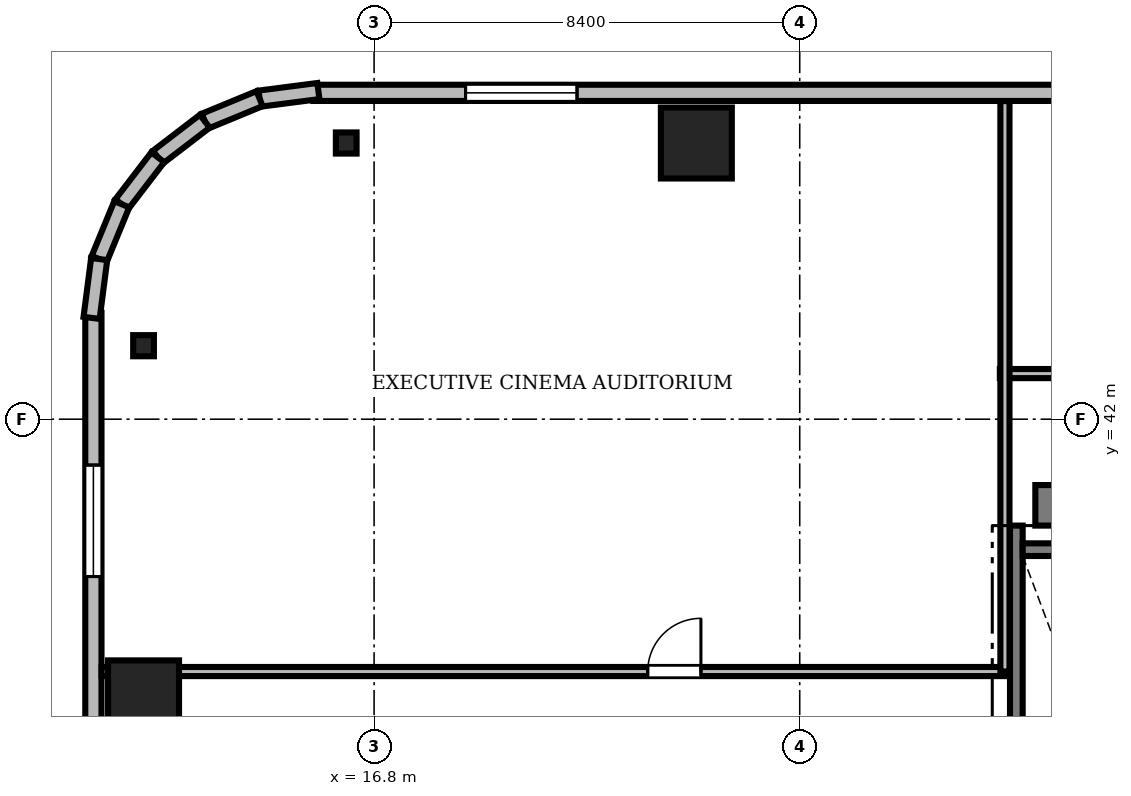
"""IFC4 building model, lengths in metres.
Left out: names, types, materials, properties, quantities, classifications, styles, units other than length and angle.
Written with IfcOpenShell. Run it as: python <this file> out.ifc"""

import sys

from ifc_helpers import new_model, si_unit, direction, frame, frame_2d, origin, origin_2d, place, context, subcontext, project, spatial, rectangle, i_section, extrude, source, transform, mapped, element, fill, save


model = new_model("IFC4")
c1 = context("Model", 3, precision=1e-05, world=origin(), true_north=direction((0.0, 1.0)))
c2 = subcontext(c1, "Body", "Model", "MODEL_VIEW")
j1 = project(units=[si_unit("LENGTHUNIT", "METRE"), si_unit("PLANEANGLEUNIT", "RADIAN")], contexts=[c1])
p1 = place(None, origin())
s1 = spatial("IfcSite", under=j1, at=p1, CompositionType="ELEMENT")
p2 = place(p1, origin())
s2 = spatial("IfcBuilding", under=s1, at=p2, CompositionType="ELEMENT")
p3 = place(p2, frame((0.0, 0.0, 177.2)))
s3 = spatial("IfcBuildingStorey", under=s2, at=p3, CompositionType="ELEMENT", Elevation=177.2)
m1 = source(origin(), c2, "Body", "SweptSolid", [
    extrude(rectangle(XDim=17.52, YDim=0.8, at=frame_2d((8.76, 0.0))), origin(), (0.0, 0.0, 1.0), 3.58),
])
p4 = place(p3, frame((29.85, 40.3, 0.0), z_axis=(0.0, 0.0, 1.0), x_axis=(1.0, 0.0, 0.0)))
e1 = element("IfcWall", 1, at=p4, inside=s3, PredefinedType="SHEAR", context=c2, shape_type="MappedRepresentation", body=[
    mapped(m1, transform((0.0, 0.0, 0.0), scale=1.0)),
])
m2 = source(origin(), c2, "Body", "SweptSolid", [
    extrude(rectangle(XDim=1.4, YDim=1.4, at=origin_2d()), origin(), (0.0, 0.0, 1.0), 3.58),
])
for number, where, z_axis, x_axis in (
    (2, (23.16, 47.45, 0.0), (0.0, 0.0, 1.0), (1.0, 0.0, 0.0)),
    (3, (12.25, 36.54, 0.0), (0.0, 0.0, 1.0), (1.0, 0.0, 0.0)),
):
    element("IfcColumn", number, at=place(p3, frame(where, z_axis=z_axis, x_axis=x_axis)), inside=s3, PredefinedType="COLUMN", context=c2, shape_type="MappedRepresentation", body=[
        mapped(m2, transform((0.0, 0.0, 0.0), scale=1.0)),
    ])
m3 = source(origin(), c2, "Body", "SweptSolid", [
    extrude(i_section(OverallWidth=0.409, OverallDepth=0.417, WebThickness=0.021, FlangeThickness=0.033, FilletRadius=0.015, at=origin_2d()), origin(), (0.0, 0.0, 1.0), 3.58),
])
for number, where, z_axis, x_axis in (
    (4, (16.25, 47.45, 0.0), (0.0, 0.0, 1.0), (1.0, 0.0, 0.0)),
    (5, (12.25, 43.45, 0.0), (0.0, 0.0, 1.0), (1.0, 0.0, 0.0)),
):
    element("IfcColumn", number, at=place(p3, frame(where, z_axis=z_axis, x_axis=x_axis)), inside=s3, PredefinedType="COLUMN", context=c2, shape_type="MappedRepresentation", body=[
        mapped(m3, transform((0.0, 0.0, 0.0), scale=1.0)),
    ])
m4 = source(origin(), c2, "Body", "SweptSolid", [
    extrude(rectangle(XDim=15.6, YDim=0.32, at=frame_2d((7.8, 0.0))), origin(), (0.0, 0.0, 1.0), 3.58),
])
p5 = place(p3, frame((31.2, 48.44, 0.0), z_axis=(0.0, 0.0, 1.0), x_axis=(-1.0, 0.0, 0.0)))
e6 = element("IfcWall", 6, at=p5, inside=s3, PredefinedType="SOLIDWALL", context=c2, shape_type="MappedRepresentation", body=[
    mapped(m4, transform((0.0, 0.0, 0.0), scale=1.0)),
])
m5 = source(origin(), c2, "Body", "SweptSolid", [
    extrude(rectangle(XDim=2.2, YDim=2.4, at=frame_2d((1.1, 1.2))), frame((0.0, 0.17, 0.0), z_axis=(0.0, -1.0, 0.0), x_axis=(1.0, 0.0, 0.0)), (0.0, 0.0, 1.0), 0.34),
])
p6 = place(p5, frame((10.395, 0.0, 0.72)))
e7 = element("IfcOpeningElement", 7, at=p6, cuts=e6, PredefinedType="OPENING", context=c2, shape_type="MappedRepresentation", body=[
    mapped(m5, transform((0.0, 0.0, 0.0), scale=1.0)),
])
m6 = source(origin(), c2, "Body", "SweptSolid", [
    extrude(rectangle(XDim=15.6, YDim=0.32, at=frame_2d((7.8, 0.0))), origin(), (0.0, 0.0, 1.0), 3.58),
])
p7 = place(p3, frame((11.26, 44.1, 0.0), z_axis=(0.0, 0.0, 1.0), x_axis=(0.0, -1.0, 0.0)))
e8 = element("IfcWall", 8, at=p7, inside=s3, PredefinedType="SOLIDWALL", context=c2, shape_type="MappedRepresentation", body=[
    mapped(m6, transform((0.0, 0.0, 0.0), scale=1.0)),
])
m7 = source(origin(), c2, "Body", "SweptSolid", [
    extrude(rectangle(XDim=1.4, YDim=2.3, at=frame_2d((0.7, 1.15))), frame((0.0, 0.17, 0.0), z_axis=(0.0, -1.0, 0.0), x_axis=(1.0, 0.0, 0.0)), (0.0, 0.0, 1.0), 0.34),
])
p8 = place(p7, frame((9.61, 0.0, 0.0)))
e9 = element("IfcOpeningElement", 9, at=p8, cuts=e8, PredefinedType="OPENING", context=c2, shape_type="MappedRepresentation", body=[
    mapped(m7, transform((0.0, 0.0, 0.0), scale=1.0)),
])
p9 = place(p7, frame((3.005, 0.0, 0.72)))
e10 = element("IfcOpeningElement", 10, at=p9, cuts=e8, PredefinedType="OPENING", context=c2, shape_type="MappedRepresentation", body=[
    mapped(m5, transform((0.0, 0.0, 0.0), scale=1.0)),
])
m8 = source(origin(), c2, "Body", "SweptSolid", [
    extrude(rectangle(XDim=1.17, YDim=0.32, at=frame_2d((0.585, 0.0))), origin(), (0.0, 0.0, 1.0), 3.58),
])
p10 = place(p3, frame((15.7, 48.476, 0.0), z_axis=(0.0, 0.0, 1.0), x_axis=(-0.991735963317, -0.128295670475, 0.0)))
e11 = element("IfcWall", 11, at=p10, inside=s3, PredefinedType="SOLIDWALL", context=c2, shape_type="MappedRepresentation", body=[
    mapped(m8, transform((0.0, 0.0, 0.0), scale=1.0)),
])
m9 = source(origin(), c2, "Body", "SweptSolid", [
    extrude(rectangle(XDim=1.169, YDim=0.32, at=frame_2d((0.584, 0.0))), origin(), (0.0, 0.0, 1.0), 3.58),
])
p11 = place(p3, frame((14.54, 48.325, 0.0), z_axis=(0.0, 0.0, 1.0), x_axis=(-0.924552646638, -0.381054331552, 0.0)))
e12 = element("IfcWall", 12, at=p11, inside=s3, PredefinedType="SOLIDWALL", context=c2, shape_type="MappedRepresentation", body=[
    mapped(m9, transform((0.0, 0.0, 0.0), scale=1.0)),
])
m10 = source(origin(), c2, "Body", "SweptSolid", [
    extrude(rectangle(XDim=1.169, YDim=0.32, at=frame_2d((0.584, 0.0))), origin(), (0.0, 0.0, 1.0), 3.58),
])
p12 = place(p3, frame((13.459, 47.88, 0.0), z_axis=(0.0, 0.0, 1.0), x_axis=(-0.793663520347, -0.608356981114, 0.0)))
e13 = element("IfcWall", 13, at=p12, inside=s3, PredefinedType="SOLIDWALL", context=c2, shape_type="MappedRepresentation", body=[
    mapped(m10, transform((0.0, 0.0, 0.0), scale=1.0)),
])
m11 = source(origin(), c2, "Body", "SweptSolid", [
    extrude(rectangle(XDim=1.169, YDim=0.32, at=frame_2d((0.584, 0.0))), origin(), (0.0, 0.0, 1.0), 3.58),
])
p13 = place(p3, frame((12.531, 47.169, 0.0), z_axis=(0.0, 0.0, 1.0), x_axis=(-0.608387696831, -0.793639975269, 0.0)))
e14 = element("IfcWall", 14, at=p13, inside=s3, PredefinedType="SOLIDWALL", context=c2, shape_type="MappedRepresentation", body=[
    mapped(m11, transform((0.0, 0.0, 0.0), scale=1.0)),
])
p14 = place(p3, frame((11.82, 46.241, 0.0), z_axis=(0.0, 0.0, 1.0), x_axis=(-0.381054331552, -0.924552646638, 0.0)))
e15 = element("IfcWall", 15, at=p14, inside=s3, PredefinedType="SOLIDWALL", context=c2, shape_type="MappedRepresentation", body=[
    mapped(m9, transform((0.0, 0.0, 0.0), scale=1.0)),
])
p15 = place(p3, frame((11.375, 45.16, 0.0), z_axis=(0.0, 0.0, 1.0), x_axis=(-0.128295670475, -0.991735963317, 0.0)))
e16 = element("IfcWall", 16, at=p15, inside=s3, PredefinedType="SOLIDWALL", context=c2, shape_type="MappedRepresentation", body=[
    mapped(m8, transform((0.0, 0.0, 0.0), scale=1.0)),
])
m12 = source(origin(), c2, "Body", "SweptSolid", [
    extrude(rectangle(XDim=9.25, YDim=0.25, at=frame_2d((4.625, 0.0))), origin(), (0.0, 0.0, 1.0), 3.6),
])
p16 = place(p3, frame((29.475, 30.65, 0.0), z_axis=(0.0, 0.0, 1.0), x_axis=(0.0, 1.0, 0.0)))
e17 = element("IfcWall", 17, at=p16, inside=s3, PredefinedType="SOLIDWALL", context=c2, shape_type="MappedRepresentation", body=[
    mapped(m12, transform((0.0, 0.0, 0.0), scale=1.0)),
])
m13 = source(origin(), c2, "Body", "SweptSolid", [
    extrude(rectangle(XDim=3.15, YDim=0.25, at=frame_2d((1.575, 0.0))), origin(), (0.0, 0.0, 1.0), 3.6),
])
p17 = place(p3, frame((29.6, 39.425, 0.0), z_axis=(0.0, 0.0, 1.0), x_axis=(1.0, 0.0, 0.0)))
e18 = element("IfcWall", 18, at=p17, inside=s3, PredefinedType="SOLIDWALL", context=c2, shape_type="MappedRepresentation", body=[
    mapped(m13, transform((0.0, 0.0, 0.0), scale=1.0)),
])
m14 = source(origin(), c2, "Body", "SweptSolid", [
    extrude(rectangle(XDim=28.428, YDim=0.18, at=frame_2d((14.214, 0.0))), origin(), (0.0, 0.0, 1.0), 2.822),
])
p18 = place(p3, frame((29.15, 42.9, 0.0), z_axis=(0.0, 0.0, 1.0), x_axis=(1.0, 0.0, 0.0)))
e19 = element("IfcWall", 19, at=p18, inside=s3, PredefinedType="PARTITIONING", context=c2, shape_type="MappedRepresentation", body=[
    mapped(m14, transform((0.0, 0.0, 0.0), scale=1.0)),
])
m15 = source(origin(), c2, "Body", "SweptSolid", [
    extrude(rectangle(XDim=1.05, YDim=2.2, at=frame_2d((0.525, 1.1))), frame((0.0, 0.1, 0.0), z_axis=(0.0, -1.0, 0.0), x_axis=(1.0, 0.0, 0.0)), (0.0, 0.0, 1.0), 0.2),
])
p19 = place(p18, frame((4.5, 0.0, 0.0)))
e20 = element("IfcOpeningElement", 20, at=p19, cuts=e19, PredefinedType="OPENING", context=c2, shape_type="MappedRepresentation", body=[
    mapped(m15, transform((0.0, 0.0, 0.0), scale=1.0)),
])
m16 = source(origin(), c2, "Body", "SweptSolid", [
    extrude(rectangle(XDim=17.828, YDim=0.18, at=frame_2d((8.914, 0.0))), origin(), (0.0, 0.0, 1.0), 2.822),
])
p20 = place(p3, frame((11.422, 37.02, 0.0), z_axis=(0.0, 0.0, 1.0), x_axis=(1.0, 0.0, 0.0)))
e21 = element("IfcWall", 21, at=p20, inside=s3, PredefinedType="PARTITIONING", context=c2, shape_type="MappedRepresentation", body=[
    mapped(m16, transform((0.0, 0.0, 0.0), scale=1.0)),
])
p21 = place(p20, frame((10.778, 0.0, 0.0)))
e22 = element("IfcOpeningElement", 22, at=p21, cuts=e21, PredefinedType="OPENING", context=c2, shape_type="MappedRepresentation", body=[
    mapped(m15, transform((0.0, 0.0, 0.0), scale=1.0)),
])
m17 = source(origin(), c2, "Body", "SweptSolid", [
    extrude(rectangle(XDim=11.258, YDim=0.18, at=frame_2d((5.629, 0.0))), origin(), (0.0, 0.0, 1.0), 2.822),
])
p22 = place(p3, frame((29.25, 37.02, 0.0), z_axis=(0.0, 0.0, 1.0), x_axis=(0.0, 1.0, 0.0)))
e23 = element("IfcWall", 23, at=p22, inside=s3, PredefinedType="PARTITIONING", context=c2, shape_type="MappedRepresentation", body=[
    mapped(m17, transform((0.0, 0.0, 0.0), scale=1.0)),
])
m18 = source(origin(), c2, "Body", "SweptSolid", [
    extrude(rectangle(XDim=2.2, YDim=2.4, at=frame_2d((1.1, 1.2))), frame((0.0, 0.03, 0.0), z_axis=(0.0, -1.0, 0.0), x_axis=(1.0, 0.0, 0.0)), (0.0, 0.0, 1.0), 0.06),
])
p23 = place(p6, origin())
e24 = element("IfcWindow", 24, at=p23, inside=s3, PartitioningType="SINGLE_PANEL", PredefinedType="WINDOW", context=c2, shape_type="MappedRepresentation", body=[
    mapped(m18, transform((0.0, 0.0, 0.0), scale=1.0)),
])
fill(e7, e24)
p24 = place(p9, origin())
e25 = element("IfcWindow", 25, at=p24, inside=s3, PartitioningType="SINGLE_PANEL", PredefinedType="WINDOW", context=c2, shape_type="MappedRepresentation", body=[
    mapped(m18, transform((0.0, 0.0, 0.0), scale=1.0)),
])
fill(e10, e25)
m19 = source(origin(), c2, "Body", "SweptSolid", [
    extrude(rectangle(XDim=1.05, YDim=2.2, at=frame_2d((0.525, 1.1))), frame((0.0, 0.025, 0.0), z_axis=(0.0, -1.0, 0.0), x_axis=(1.0, 0.0, 0.0)), (0.0, 0.0, 1.0), 0.05),
])
p25 = place(p21, origin())
e26 = element("IfcDoor", 26, at=p25, inside=s3, OperationType="SINGLE_SWING_RIGHT", PredefinedType="DOOR", context=c2, shape_type="MappedRepresentation", body=[
    mapped(m19, transform((0.0, 0.0, 0.0), scale=1.0)),
])
fill(e22, e26)
save(model, sys.argv[1])
